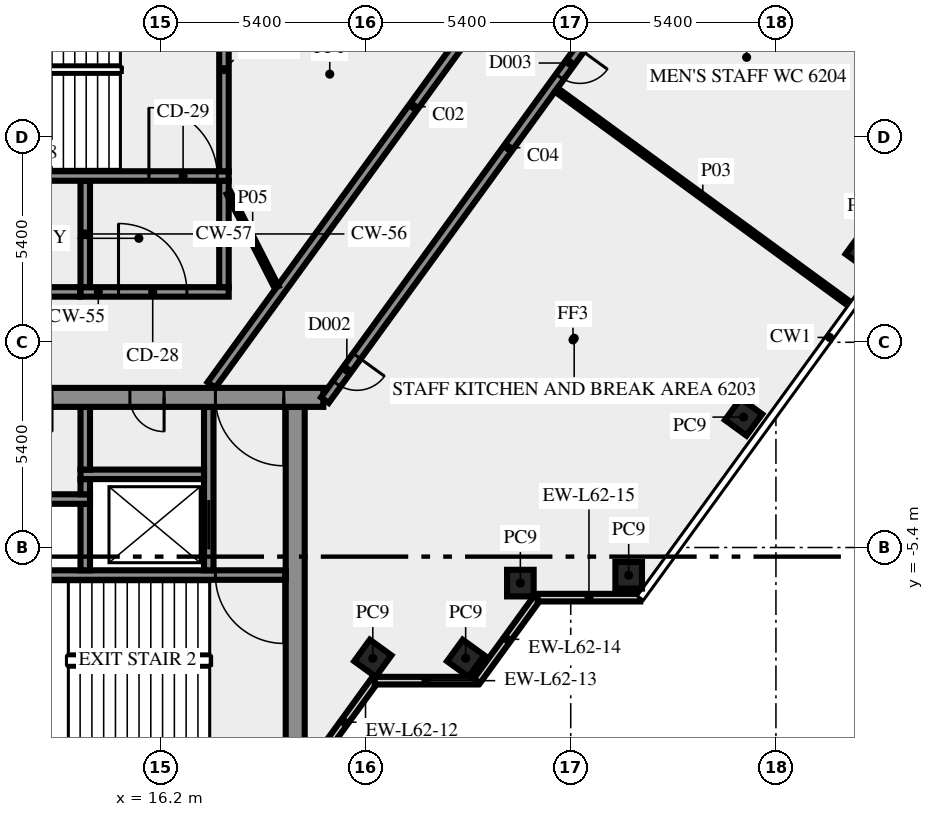
"""IFC4 building model, lengths in metres.
Left out: names, types, materials, properties, quantities, classifications, styles, units other than length and angle.
Written with IfcOpenShell. Run it as: python <this file> out.ifc"""

import sys

from ifc_helpers import new_model, si_unit, direction, frame, frame_2d, origin, origin_2d, place, context, subcontext, project, spatial, rectangle, extrude, element, fill, save


model = new_model("IFC4")
c1 = context("Model", 3, precision=1e-05, world=origin(), true_north=direction((0.0, 1.0)))
c2 = subcontext(c1, "Body", "Model", "MODEL_VIEW")
j1 = project(units=[si_unit("LENGTHUNIT", "METRE"), si_unit("PLANEANGLEUNIT", "RADIAN")], contexts=[c1])
p1 = place(None, origin())
s1 = spatial("IfcSite", under=j1, at=p1, CompositionType="ELEMENT")
p2 = place(p1, origin())
s2 = spatial("IfcBuilding", under=s1, at=p2, CompositionType="ELEMENT")
p3 = place(p2, frame((0.0, 0.0, 265.0)))
s3 = spatial("IfcBuildingStorey", under=s2, at=p3, CompositionType="ELEMENT", Elevation=265.0)
for number, where, z_axis, x_axis in (
    (1, (21.792, -8.315, 0.0), (0.0, 0.0, 1.0), (0.588, 0.809, 0.0)),
    (2, (24.235, -8.315, 0.0), (0.0, 0.0, 1.0), (0.588, 0.809, 0.0)),
    (3, (25.674, -6.337, 0.0), (0.0, 0.0, 1.0), (1.0, 0.0, 0.0)),
    (4, (28.525, -6.13, 0.0), (0.0, 0.0, 1.0), (1.0, 0.0, 0.0)),
    (5, (31.548, -1.969, 0.0), (0.0, 0.0, 1.0), (0.588, 0.809, 0.0)),
    (6, (34.722, 2.4, 0.0), (0.0, 0.0, 1.0), (0.588, 0.809, 0.0)),
):
    element("IfcColumn", number, at=place(p3, frame(where, z_axis=z_axis, x_axis=x_axis)), inside=s3, PredefinedType="COLUMN", context=c2, shape_type="SweptSolid", body=[
        extrude(rectangle(XDim=0.7, YDim=0.7, at=origin_2d()), origin(), (0.0, 0.0, 1.0), 3.65),
    ])
p4 = place(p3, frame((20.253, -11.083, 0.0), z_axis=(0.0, 0.0, 1.0), x_axis=(0.587766567315, 0.809030569476, 0.0)))
e7 = element("IfcWall", 7, at=p4, inside=s3, PredefinedType="SOLIDWALL", context=c2, shape_type="SweptSolid", body=[
    extrude(rectangle(XDim=2.688, YDim=0.2, at=frame_2d((1.344, 0.0))), origin(), (0.0, 0.0, 1.0), 3.65),
])
p5 = place(p3, frame((21.843, -8.904, 0.0), z_axis=(0.0, 0.0, 1.0), x_axis=(1.0, 0.0, 0.0)))
e8 = element("IfcWall", 8, at=p5, inside=s3, PredefinedType="SOLIDWALL", context=c2, shape_type="SweptSolid", body=[
    extrude(rectangle(XDim=2.7, YDim=0.2, at=frame_2d((1.35, 0.0))), origin(), (0.0, 0.0, 1.0), 3.65),
])
p6 = place(p3, frame((24.533, -8.909, 0.0), z_axis=(0.0, 0.0, 1.0), x_axis=(0.587720002413, 0.809064397168, 0.0)))
e9 = element("IfcWall", 9, at=p6, inside=s3, PredefinedType="SOLIDWALL", context=c2, shape_type="SweptSolid", body=[
    extrude(rectangle(XDim=2.7, YDim=0.2, at=frame_2d((1.35, 0.0))), origin(), (0.0, 0.0, 1.0), 3.65),
])
p7 = place(p3, frame((26.13, -6.719, 0.0), z_axis=(0.0, 0.0, 1.0), x_axis=(1.0, 0.0, 0.0)))
e10 = element("IfcWall", 10, at=p7, inside=s3, PredefinedType="SOLIDWALL", context=c2, shape_type="SweptSolid", body=[
    extrude(rectangle(XDim=2.7, YDim=0.2, at=frame_2d((1.35, 0.0))), origin(), (0.0, 0.0, 1.0), 3.65),
])
p8 = place(p3, frame((19.75, -10.5, 0.0), z_axis=(0.0, 0.0, 1.0), x_axis=(0.0, 1.0, 0.0)))
e11 = element("IfcWall", 11, at=p8, inside=s3, PredefinedType="SHEAR", context=c2, shape_type="SweptSolid", body=[
    extrude(rectangle(XDim=8.8, YDim=0.5, at=frame_2d((4.4, 0.0))), origin(), (0.0, 0.0, 1.0), 3.65),
])
p9 = place(p3, frame((19.5, -6.125, 0.0), z_axis=(0.0, 0.0, 1.0), x_axis=(-1.0, 0.0, 0.0)))
e12 = element("IfcWall", 12, at=p9, inside=s3, PredefinedType="SHEAR", context=c2, shape_type="SweptSolid", body=[
    extrude(rectangle(XDim=8.05, YDim=0.25, at=frame_2d((4.025, 0.0))), origin(), (0.0, 0.0, 1.0), 3.65),
])
p10 = place(p9, frame((0.05, 0.0, 0.0)))
e13 = element("IfcOpeningElement", 13, at=p10, cuts=e12, PredefinedType="OPENING", context=c2, shape_type="SweptSolid", body=[
    extrude(rectangle(XDim=1.8, YDim=2.1, at=frame_2d((0.9, 1.05))), frame((0.0, 0.135, 0.0), z_axis=(0.0, -1.0, 0.0), x_axis=(1.0, 0.0, 0.0)), (0.0, 0.0, 1.0), 0.27),
])
p11 = place(p3, frame((14.225, -6.0, 0.0), z_axis=(0.0, 0.0, 1.0), x_axis=(0.0, 1.0, 0.0)))
e14 = element("IfcWall", 14, at=p11, inside=s3, PredefinedType="SHEAR", context=c2, shape_type="SweptSolid", body=[
    extrude(rectangle(XDim=1.75, YDim=0.25, at=frame_2d((0.875, 0.0))), origin(), (0.0, 0.0, 1.0), 3.65),
])
p12 = place(p3, frame((17.475, -6.0, 0.0), z_axis=(0.0, 0.0, 1.0), x_axis=(0.0, 1.0, 0.0)))
e15 = element("IfcWall", 15, at=p12, inside=s3, PredefinedType="SHEAR", context=c2, shape_type="SweptSolid", body=[
    extrude(rectangle(XDim=4.3, YDim=0.25, at=frame_2d((2.15, 0.0))), origin(), (0.0, 0.0, 1.0), 3.65),
])
p13 = place(p12, frame((0.55, 0.0, 0.0)))
e16 = element("IfcOpeningElement", 16, at=p13, cuts=e15, PredefinedType="OPENING", context=c2, shape_type="SweptSolid", body=[
    extrude(rectangle(XDim=1.3, YDim=2.1, at=frame_2d((0.65, 1.05))), frame((0.0, 0.135, 0.0), z_axis=(0.0, -1.0, 0.0), x_axis=(1.0, 0.0, 0.0)), (0.0, 0.0, 1.0), 0.27),
])
p14 = place(p3, frame((1.45, -4.125, 0.0), z_axis=(0.0, 0.0, 1.0), x_axis=(1.0, 0.0, 0.0)))
e17 = element("IfcWall", 17, at=p14, inside=s3, PredefinedType="SHEAR", context=c2, shape_type="SweptSolid", body=[
    extrude(rectangle(XDim=12.9, YDim=0.25, at=frame_2d((6.45, 0.0))), origin(), (0.0, 0.0, 1.0), 3.65),
])
p15 = place(p14, frame((0.7, 0.0, 0.0)))
e18 = element("IfcOpeningElement", 18, at=p15, cuts=e17, PredefinedType="OPENING", context=c2, shape_type="SweptSolid", body=[
    extrude(rectangle(XDim=1.3, YDim=2.1, at=frame_2d((0.65, 1.05))), frame((0.0, 0.135, 0.0), z_axis=(0.0, -1.0, 0.0), x_axis=(1.0, 0.0, 0.0)), (0.0, 0.0, 1.0), 0.27),
])
p16 = place(p3, frame((14.225, -4.0, 0.0), z_axis=(0.0, 0.0, 1.0), x_axis=(0.0, 1.0, 0.0)))
e19 = element("IfcWall", 19, at=p16, inside=s3, PredefinedType="SHEAR", context=c2, shape_type="SweptSolid", body=[
    extrude(rectangle(XDim=0.4, YDim=0.25, at=frame_2d((0.2, 0.0))), origin(), (0.0, 0.0, 1.0), 3.65),
])
p17 = place(p3, frame((14.1, -3.475, 0.0), z_axis=(0.0, 0.0, 1.0), x_axis=(1.0, 0.0, 0.0)))
e20 = element("IfcWall", 20, at=p17, inside=s3, PredefinedType="SHEAR", context=c2, shape_type="SweptSolid", body=[
    extrude(rectangle(XDim=3.25, YDim=0.25, at=frame_2d((1.625, 0.0))), origin(), (0.0, 0.0, 1.0), 3.65),
])
p18 = place(p3, frame((14.225, -3.35, 0.0), z_axis=(0.0, 0.0, 1.0), x_axis=(0.0, 1.0, 0.0)))
e21 = element("IfcWall", 21, at=p18, inside=s3, PredefinedType="SHEAR", context=c2, shape_type="SweptSolid", body=[
    extrude(rectangle(XDim=1.65, YDim=0.25, at=frame_2d((0.825, 0.0))), origin(), (0.0, 0.0, 1.0), 3.65),
])
p19 = place(p3, frame((20.49, -1.45, 0.0), z_axis=(0.0, 0.0, 1.0), x_axis=(-1.0, 0.0, 0.0)))
e22 = element("IfcWall", 22, at=p19, inside=s3, PredefinedType="SHEAR", context=c2, shape_type="SweptSolid", body=[
    extrude(rectangle(XDim=40.98, YDim=0.5, at=frame_2d((20.49, 0.0))), origin(), (0.0, 0.0, 1.0), 3.65),
])
p20 = place(p19, frame((38.14, 0.0, 0.0)))
e23 = element("IfcOpeningElement", 23, at=p20, cuts=e22, PredefinedType="OPENING", context=c2, shape_type="SweptSolid", body=[
    extrude(rectangle(XDim=1.8, YDim=2.1, at=frame_2d((0.9, 1.05))), frame((0.0, 0.26, 0.0), z_axis=(0.0, -1.0, 0.0), x_axis=(1.0, 0.0, 0.0)), (0.0, 0.0, 1.0), 0.52),
])
p21 = place(p19, frame((36.728, 0.0, 0.0)))
e24 = element("IfcOpeningElement", 24, at=p21, cuts=e22, PredefinedType="OPENING", context=c2, shape_type="SweptSolid", body=[
    extrude(rectangle(XDim=0.8, YDim=2.1, at=frame_2d((0.4, 1.05))), frame((0.0, 0.26, 0.0), z_axis=(0.0, -1.0, 0.0), x_axis=(1.0, 0.0, 0.0)), (0.0, 0.0, 1.0), 0.52),
])
p22 = place(p19, frame((35.153, 0.0, 0.0)))
e25 = element("IfcOpeningElement", 25, at=p22, cuts=e22, PredefinedType="OPENING", context=c2, shape_type="SweptSolid", body=[
    extrude(rectangle(XDim=0.8, YDim=2.1, at=frame_2d((0.4, 1.05))), frame((0.0, 0.26, 0.0), z_axis=(0.0, -1.0, 0.0), x_axis=(1.0, 0.0, 0.0)), (0.0, 0.0, 1.0), 0.52),
])
p23 = place(p19, frame((32.94, 0.0, 0.0)))
e26 = element("IfcOpeningElement", 26, at=p23, cuts=e22, PredefinedType="OPENING", context=c2, shape_type="SweptSolid", body=[
    extrude(rectangle(XDim=0.9, YDim=2.1, at=frame_2d((0.45, 1.05))), frame((0.0, 0.26, 0.0), z_axis=(0.0, -1.0, 0.0), x_axis=(1.0, 0.0, 0.0)), (0.0, 0.0, 1.0), 0.52),
])
p24 = place(p19, frame((31.015, 0.0, 0.0)))
e27 = element("IfcOpeningElement", 27, at=p24, cuts=e22, PredefinedType="OPENING", context=c2, shape_type="SweptSolid", body=[
    extrude(rectangle(XDim=0.8, YDim=2.1, at=frame_2d((0.4, 1.05))), frame((0.0, 0.26, 0.0), z_axis=(0.0, -1.0, 0.0), x_axis=(1.0, 0.0, 0.0)), (0.0, 0.0, 1.0), 0.52),
])
p25 = place(p19, frame((24.765, 0.0, 0.0)))
e28 = element("IfcOpeningElement", 28, at=p25, cuts=e22, PredefinedType="OPENING", context=c2, shape_type="SweptSolid", body=[
    extrude(rectangle(XDim=0.8, YDim=2.1, at=frame_2d((0.4, 1.05))), frame((0.0, 0.26, 0.0), z_axis=(0.0, -1.0, 0.0), x_axis=(1.0, 0.0, 0.0)), (0.0, 0.0, 1.0), 0.52),
])
p26 = place(p19, frame((19.59, 0.0, 0.0)))
e29 = element("IfcOpeningElement", 29, at=p26, cuts=e22, PredefinedType="OPENING", context=c2, shape_type="SweptSolid", body=[
    extrude(rectangle(XDim=2.0, YDim=2.1, at=frame_2d((1.0, 1.05))), frame((0.0, 0.26, 0.0), z_axis=(0.0, -1.0, 0.0), x_axis=(1.0, 0.0, 0.0)), (0.0, 0.0, 1.0), 0.52),
])
p27 = place(p19, frame((13.202, 0.0, 0.0)))
e30 = element("IfcOpeningElement", 30, at=p27, cuts=e22, PredefinedType="OPENING", context=c2, shape_type="SweptSolid", body=[
    extrude(rectangle(XDim=0.9, YDim=2.1, at=frame_2d((0.45, 1.05))), frame((0.0, 0.26, 0.0), z_axis=(0.0, -1.0, 0.0), x_axis=(1.0, 0.0, 0.0)), (0.0, 0.0, 1.0), 0.52),
])
p28 = place(p19, frame((9.478, 0.0, 0.0)))
e31 = element("IfcOpeningElement", 31, at=p28, cuts=e22, PredefinedType="OPENING", context=c2, shape_type="SweptSolid", body=[
    extrude(rectangle(XDim=0.9, YDim=2.1, at=frame_2d((0.45, 1.05))), frame((0.0, 0.26, 0.0), z_axis=(0.0, -1.0, 0.0), x_axis=(1.0, 0.0, 0.0)), (0.0, 0.0, 1.0), 0.52),
])
p29 = place(p19, frame((7.14, 0.0, 0.0)))
e32 = element("IfcOpeningElement", 32, at=p29, cuts=e22, PredefinedType="OPENING", context=c2, shape_type="SweptSolid", body=[
    extrude(rectangle(XDim=0.9, YDim=2.1, at=frame_2d((0.45, 1.05))), frame((0.0, 0.26, 0.0), z_axis=(0.0, -1.0, 0.0), x_axis=(1.0, 0.0, 0.0)), (0.0, 0.0, 1.0), 0.52),
])
p30 = place(p19, frame((4.19, 0.0, 0.0)))
e33 = element("IfcOpeningElement", 33, at=p30, cuts=e22, PredefinedType="OPENING", context=c2, shape_type="SweptSolid", body=[
    extrude(rectangle(XDim=0.9, YDim=2.1, at=frame_2d((0.45, 1.05))), frame((0.0, 0.26, 0.0), z_axis=(0.0, -1.0, 0.0), x_axis=(1.0, 0.0, 0.0)), (0.0, 0.0, 1.0), 0.52),
])
p31 = place(p19, frame((1.04, 0.0, 0.0)))
e34 = element("IfcOpeningElement", 34, at=p31, cuts=e22, PredefinedType="OPENING", context=c2, shape_type="SweptSolid", body=[
    extrude(rectangle(XDim=1.8, YDim=2.1, at=frame_2d((0.9, 1.05))), frame((0.0, 0.26, 0.0), z_axis=(0.0, -1.0, 0.0), x_axis=(1.0, 0.0, 0.0)), (0.0, 0.0, 1.0), 0.52),
])
p32 = place(p3, frame((14.1, 1.325, 0.0), z_axis=(0.0, 0.0, 1.0), x_axis=(1.0, 0.0, 0.0)))
e35 = element("IfcWall", 35, at=p32, inside=s3, PredefinedType="SHEAR", context=c2, shape_type="SweptSolid", body=[
    extrude(rectangle(XDim=3.9, YDim=0.25, at=frame_2d((1.95, 0.0))), origin(), (0.0, 0.0, 1.0), 3.65),
])
p33 = place(p32, frame((1.0, 0.0, 0.0)))
e36 = element("IfcOpeningElement", 36, at=p33, cuts=e35, PredefinedType="OPENING", context=c2, shape_type="SweptSolid", body=[
    extrude(rectangle(XDim=1.8, YDim=2.1, at=frame_2d((0.9, 1.05))), frame((0.0, 0.135, 0.0), z_axis=(0.0, -1.0, 0.0), x_axis=(1.0, 0.0, 0.0)), (0.0, 0.0, 1.0), 0.27),
])
for number, where, z_axis, x_axis in (
    (37, (14.225, 1.45, 0.0), (0.0, 0.0, 1.0), (0.0, 1.0, 0.0)),
    (38, (17.875, 1.45, 0.0), (0.0, 0.0, 1.0), (0.0, 1.0, 0.0)),
):
    element("IfcWall", number, at=place(p3, frame(where, z_axis=z_axis, x_axis=x_axis)), inside=s3, PredefinedType="SHEAR", context=c2, shape_type="SweptSolid", body=[
        extrude(rectangle(XDim=2.8, YDim=0.25, at=frame_2d((1.4, 0.0))), origin(), (0.0, 0.0, 1.0), 3.65),
    ])
p34 = place(p3, frame((7.5, 4.375, 0.0), z_axis=(0.0, 0.0, 1.0), x_axis=(1.0, 0.0, 0.0)))
e39 = element("IfcWall", 39, at=p34, inside=s3, PredefinedType="SHEAR", context=c2, shape_type="SweptSolid", body=[
    extrude(rectangle(XDim=10.5, YDim=0.25, at=frame_2d((5.25, 0.0))), origin(), (0.0, 0.0, 1.0), 3.65),
])
p35 = place(p34, frame((8.4, 0.0, 0.0)))
e40 = element("IfcOpeningElement", 40, at=p35, cuts=e39, PredefinedType="OPENING", context=c2, shape_type="SweptSolid", body=[
    extrude(rectangle(XDim=1.8, YDim=2.1, at=frame_2d((0.9, 1.05))), frame((0.0, 0.135, 0.0), z_axis=(0.0, -1.0, 0.0), x_axis=(1.0, 0.0, 0.0)), (0.0, 0.0, 1.0), 0.27),
])
p36 = place(p3, frame((17.875, 4.5, 0.0), z_axis=(0.0, 0.0, 1.0), x_axis=(0.0, 1.0, 0.0)))
e41 = element("IfcWall", 41, at=p36, inside=s3, PredefinedType="SHEAR", context=c2, shape_type="SweptSolid", body=[
    extrude(rectangle(XDim=5.35, YDim=0.25, at=frame_2d((2.675, 0.0))), origin(), (0.0, 0.0, 1.0), 3.65),
])
p37 = place(p3, frame((-5.341, 1.325, 0.0), z_axis=(0.0, 0.0, 1.0), x_axis=(1.0, 0.0, 0.0)))
e42 = element("IfcWall", 42, at=p37, inside=s3, PredefinedType="SOLIDWALL", context=c2, shape_type="SweptSolid", body=[
    extrude(rectangle(XDim=19.431, YDim=0.25, at=frame_2d((9.716, 0.0))), origin(), (0.0, 0.0, 1.0), 3.65),
])
p38 = place(p37, frame((8.866, 0.0, 0.0)))
e43 = element("IfcOpeningElement", 43, at=p38, cuts=e42, PredefinedType="OPENING", context=c2, shape_type="SweptSolid", body=[
    extrude(rectangle(XDim=1.8, YDim=2.1, at=frame_2d((0.9, 1.05))), frame((0.0, 0.135, 0.0), z_axis=(0.0, -1.0, 0.0), x_axis=(1.0, 0.0, 0.0)), (0.0, 0.0, 1.0), 0.27),
])
p39 = place(p3, frame((17.545, -1.125, 0.0), z_axis=(0.0, 0.0, 1.0), x_axis=(0.58779555165, 0.809009511354, 0.0)))
e44 = element("IfcWall", 44, at=p39, inside=s3, PredefinedType="SOLIDWALL", context=c2, shape_type="SweptSolid", body=[
    extrude(rectangle(XDim=18.103, YDim=0.25, at=frame_2d((9.052, 0.0))), origin(), (0.0, 0.0, 1.0), 3.65),
])
p40 = place(p39, frame((16.728, 0.0, 0.0)))
e45 = element("IfcOpeningElement", 45, at=p40, cuts=e44, PredefinedType="OPENING", context=c2, shape_type="SweptSolid", body=[
    extrude(rectangle(XDim=0.9, YDim=2.1, at=frame_2d((0.45, 1.05))), frame((0.0, 0.135, 0.0), z_axis=(0.0, -1.0, 0.0), x_axis=(1.0, 0.0, 0.0)), (0.0, 0.0, 1.0), 0.27),
])
p41 = place(p3, frame((30.183, 11.761, 0.0), z_axis=(0.0, 0.0, 1.0), x_axis=(-0.587781762867, -0.80901952958, 0.0)))
e46 = element("IfcWall", 46, at=p41, inside=s3, PredefinedType="SOLIDWALL", context=c2, shape_type="SweptSolid", body=[
    extrude(rectangle(XDim=16.42, YDim=0.25, at=frame_2d((8.21, 0.0))), origin(), (0.0, 0.0, 1.0), 3.65),
])
p42 = place(p41, frame((5.005, 0.0, 0.0)))
e47 = element("IfcOpeningElement", 47, at=p42, cuts=e46, PredefinedType="OPENING", context=c2, shape_type="SweptSolid", body=[
    extrude(rectangle(XDim=0.9, YDim=2.1, at=frame_2d((0.45, 1.05))), frame((0.0, 0.135, 0.0), z_axis=(0.0, -1.0, 0.0), x_axis=(1.0, 0.0, 0.0)), (0.0, 0.0, 1.0), 0.27),
])
p43 = place(p41, frame((14.988, 0.0, 0.0)))
e48 = element("IfcOpeningElement", 48, at=p43, cuts=e46, PredefinedType="OPENING", context=c2, shape_type="SweptSolid", body=[
    extrude(rectangle(XDim=0.9, YDim=2.1, at=frame_2d((0.45, 1.05))), frame((0.0, 0.135, 0.0), z_axis=(0.0, -1.0, 0.0), x_axis=(1.0, 0.0, 0.0)), (0.0, 0.0, 1.0), 0.27),
])
p44 = place(p3, frame((37.458, 6.76, 0.0), z_axis=(0.0, 0.0, 1.0), x_axis=(-0.809016295501, 0.587786214209, 0.0)))
e49 = element("IfcWall", 49, at=p44, inside=s3, PredefinedType="PARTITIONING", context=c2, shape_type="SweptSolid", body=[
    extrude(rectangle(XDim=8.7, YDim=0.15, at=frame_2d((4.35, 0.0))), origin(), (0.0, 0.0, 1.0), 3.65),
])
p45 = place(p3, frame((26.619, 6.643, 0.0), z_axis=(0.0, 0.0, 1.0), x_axis=(0.807594822539, -0.589737740532, 0.0)))
e50 = element("IfcWall", 50, at=p45, inside=s3, PredefinedType="PARTITIONING", context=c2, shape_type="SweptSolid", body=[
    extrude(rectangle(XDim=9.55, YDim=0.12, at=frame_2d((4.775, 0.0))), origin(), (0.0, 0.0, 1.0), 2.95),
])
p46 = place(p3, frame((18.0, 3.925, 0.0), z_axis=(0.0, 0.0, 1.0), x_axis=(0.453950796792, -0.891026752736, 0.0)))
e51 = element("IfcWall", 51, at=p46, inside=s3, PredefinedType="PARTITIONING", context=c2, shape_type="SweptSolid", body=[
    extrude(rectangle(XDim=2.778, YDim=0.12, at=frame_2d((1.389, 0.0))), origin(), (0.0, 0.0, 1.0), 3.65),
])
p47 = place(p10, origin())
e52 = element("IfcDoor", 52, at=p47, inside=s3, OperationType="DOUBLE_DOOR_SINGLE_SWING", PredefinedType="DOOR", context=c2, shape_type="SweptSolid", body=[
    extrude(rectangle(XDim=1.8, YDim=2.1, at=frame_2d((0.9, 1.05))), frame((0.0, 0.025, 0.0), z_axis=(0.0, -1.0, 0.0), x_axis=(1.0, 0.0, 0.0)), (0.0, 0.0, 1.0), 0.05),
])
fill(e13, e52)
p48 = place(p13, origin())
e53 = element("IfcDoor", 53, at=p48, inside=s3, OperationType="DOUBLE_DOOR_SLIDING", PredefinedType="DOOR", context=c2, shape_type="SweptSolid", body=[
    extrude(rectangle(XDim=1.3, YDim=2.1, at=frame_2d((0.65, 1.05))), frame((0.0, 0.025, 0.0), z_axis=(0.0, -1.0, 0.0), x_axis=(1.0, 0.0, 0.0)), (0.0, 0.0, 1.0), 0.05),
])
fill(e16, e53)
p49 = place(p30, origin())
e54 = element("IfcDoor", 54, at=p49, inside=s3, OperationType="SINGLE_SWING_LEFT", PredefinedType="DOOR", context=c2, shape_type="SweptSolid", body=[
    extrude(rectangle(XDim=0.9, YDim=2.1, at=frame_2d((0.45, 1.05))), frame((0.0, 0.025, 0.0), z_axis=(0.0, -1.0, 0.0), x_axis=(1.0, 0.0, 0.0)), (0.0, 0.0, 1.0), 0.05),
])
fill(e33, e54)
p50 = place(p31, origin())
e55 = element("IfcDoor", 55, at=p50, inside=s3, OperationType="DOUBLE_DOOR_SINGLE_SWING", PredefinedType="DOOR", context=c2, shape_type="SweptSolid", body=[
    extrude(rectangle(XDim=1.8, YDim=2.1, at=frame_2d((0.9, 1.05))), frame((0.0, 0.025, 0.0), z_axis=(0.0, -1.0, 0.0), x_axis=(1.0, 0.0, 0.0)), (0.0, 0.0, 1.0), 0.05),
])
fill(e34, e55)
p51 = place(p33, origin())
e56 = element("IfcDoor", 56, at=p51, inside=s3, OperationType="DOUBLE_DOOR_SINGLE_SWING", PredefinedType="DOOR", context=c2, shape_type="SweptSolid", body=[
    extrude(rectangle(XDim=1.8, YDim=2.1, at=frame_2d((0.9, 1.05))), frame((0.0, 0.025, 0.0), z_axis=(0.0, -1.0, 0.0), x_axis=(1.0, 0.0, 0.0)), (0.0, 0.0, 1.0), 0.05),
])
fill(e36, e56)
p52 = place(p35, origin())
e57 = element("IfcDoor", 57, at=p52, inside=s3, OperationType="DOUBLE_DOOR_SINGLE_SWING", PredefinedType="DOOR", context=c2, shape_type="SweptSolid", body=[
    extrude(rectangle(XDim=1.8, YDim=2.1, at=frame_2d((0.9, 1.05))), frame((0.0, 0.025, 0.0), z_axis=(0.0, -1.0, 0.0), x_axis=(1.0, 0.0, 0.0)), (0.0, 0.0, 1.0), 0.05),
])
fill(e40, e57)
p53 = place(p42, origin())
e58 = element("IfcDoor", 58, at=p53, inside=s3, OperationType="SINGLE_SWING_RIGHT", PredefinedType="DOOR", context=c2, shape_type="SweptSolid", body=[
    extrude(rectangle(XDim=0.9, YDim=2.1, at=frame_2d((0.45, 1.05))), frame((0.0, 0.025, 0.0), z_axis=(0.0, -1.0, 0.0), x_axis=(1.0, 0.0, 0.0)), (0.0, 0.0, 1.0), 0.05),
])
fill(e47, e58)
p54 = place(p43, origin())
e59 = element("IfcDoor", 59, at=p54, inside=s3, OperationType="SINGLE_SWING_RIGHT", PredefinedType="DOOR", context=c2, shape_type="SweptSolid", body=[
    extrude(rectangle(XDim=0.9, YDim=2.1, at=frame_2d((0.45, 1.05))), frame((0.0, 0.025, 0.0), z_axis=(0.0, -1.0, 0.0), x_axis=(1.0, 0.0, 0.0)), (0.0, 0.0, 1.0), 0.05),
])
fill(e48, e59)
save(model, sys.argv[1])
